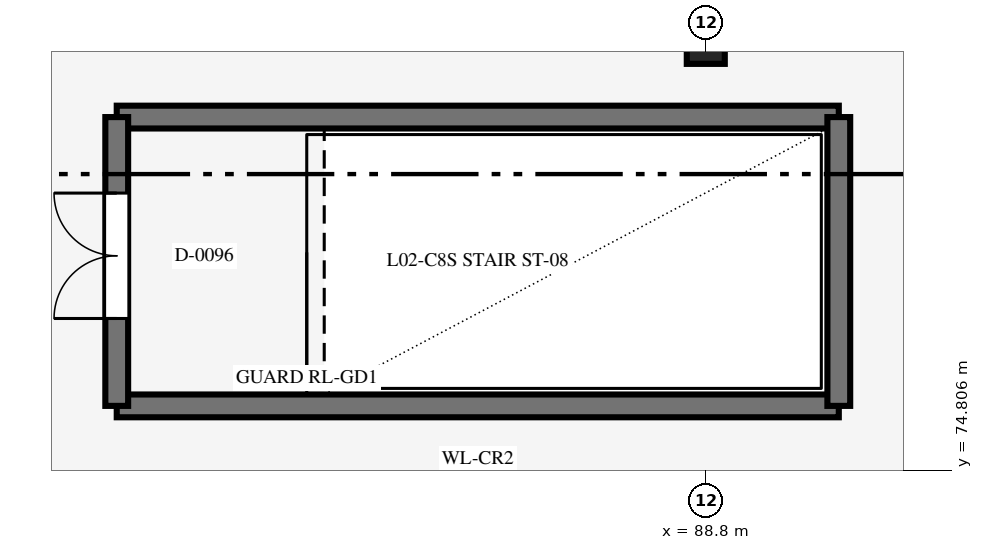
"""IFC4 building model, lengths in metres.
Left out: names, types, materials, properties, quantities, classifications, styles, units other than length and angle.
Written with IfcOpenShell. Run it as: python <this file> out.ifc"""

import sys

from ifc_helpers import new_model, si_unit, direction, frame, frame_2d, origin, origin_2d, place, context, subcontext, project, spatial, rectangle, extrude, element, fill, save


model = new_model("IFC4")
c1 = context("Model", 3, precision=1e-05, world=origin(), true_north=direction((0.0, 1.0)))
c2 = subcontext(c1, "Body", "Model", "MODEL_VIEW")
j1 = project(units=[si_unit("LENGTHUNIT", "METRE"), si_unit("PLANEANGLEUNIT", "RADIAN")], contexts=[c1])
p1 = place(None, origin())
s1 = spatial("IfcSite", under=j1, at=p1, CompositionType="ELEMENT")
p2 = place(p1, origin())
s2 = spatial("IfcBuilding", under=s1, at=p2, CompositionType="ELEMENT")
p3 = place(p2, frame((0.0, 0.0, 12.0)))
s3 = spatial("IfcBuildingStorey", under=s2, at=p3, CompositionType="ELEMENT", Elevation=12.0)
p4 = place(p3, frame((88.8, 80.4, 0.0), z_axis=(0.0, 0.0, 1.0), x_axis=(1.0, 0.0, 0.0)))
e1 = element("IfcColumn", 1, at=p4, inside=s3, PredefinedType="COLUMN", context=c2, shape_type="SweptSolid", body=[
    extrude(rectangle(XDim=0.5, YDim=0.5, at=origin_2d()), origin(), (0.0, 0.0, 1.0), 3.9),
])
for number, where, z_axis, x_axis in (
    (2, (90.55, 75.65, 0.0), (0.0, 0.0, 1.0), (-1.0, 0.0, 0.0)),
    (3, (81.05, 79.45, 0.0), (0.0, 0.0, 1.0), (1.0, 0.0, 0.0)),
):
    element("IfcWall", number, at=place(p3, frame(where, z_axis=z_axis, x_axis=x_axis)), inside=s3, PredefinedType="SHEAR", context=c2, shape_type="SweptSolid", body=[
        extrude(rectangle(XDim=9.5, YDim=0.3, at=frame_2d((4.75, 0.0))), origin(), (0.0, 0.0, 1.0), 3.3),
    ])
p5 = place(p3, frame((81.05, 75.65, 0.0), z_axis=(0.0, 0.0, 1.0), x_axis=(0.0, 1.0, 0.0)))
e4 = element("IfcWall", 4, at=p5, inside=s3, PredefinedType="SHEAR", context=c2, shape_type="SweptSolid", body=[
    extrude(rectangle(XDim=3.8, YDim=0.3, at=frame_2d((1.9, 0.0))), origin(), (0.0, 0.0, 1.0), 3.3),
])
p6 = place(p5, frame((1.15, 0.0, 0.0)))
e5 = element("IfcOpeningElement", 5, at=p6, cuts=e4, PredefinedType="OPENING", context=c2, shape_type="SweptSolid", body=[
    extrude(rectangle(XDim=1.65, YDim=2.2, at=frame_2d((0.825, 1.1))), frame((0.0, 0.16, 0.0), z_axis=(0.0, -1.0, 0.0), x_axis=(1.0, 0.0, 0.0)), (0.0, 0.0, 1.0), 0.32),
])
p7 = place(p3, frame((90.55, 75.65, 0.0), z_axis=(0.0, 0.0, 1.0), x_axis=(0.0, 1.0, 0.0)))
e6 = element("IfcWall", 6, at=p7, inside=s3, PredefinedType="SHEAR", context=c2, shape_type="SweptSolid", body=[
    extrude(rectangle(XDim=3.8, YDim=0.3, at=frame_2d((1.9, 0.0))), origin(), (0.0, 0.0, 1.0), 3.3),
])
p8 = place(p6, origin())
e7 = element("IfcDoor", 7, at=p8, inside=s3, OperationType="DOUBLE_DOOR_SINGLE_SWING", PredefinedType="DOOR", context=c2, shape_type="SweptSolid", body=[
    extrude(rectangle(XDim=1.65, YDim=2.2, at=frame_2d((0.825, 1.1))), frame((0.0, 0.025, 0.0), z_axis=(0.0, -1.0, 0.0), x_axis=(1.0, 0.0, 0.0)), (0.0, 0.0, 1.0), 0.05),
])
fill(e5, e7)
save(model, sys.argv[1])
